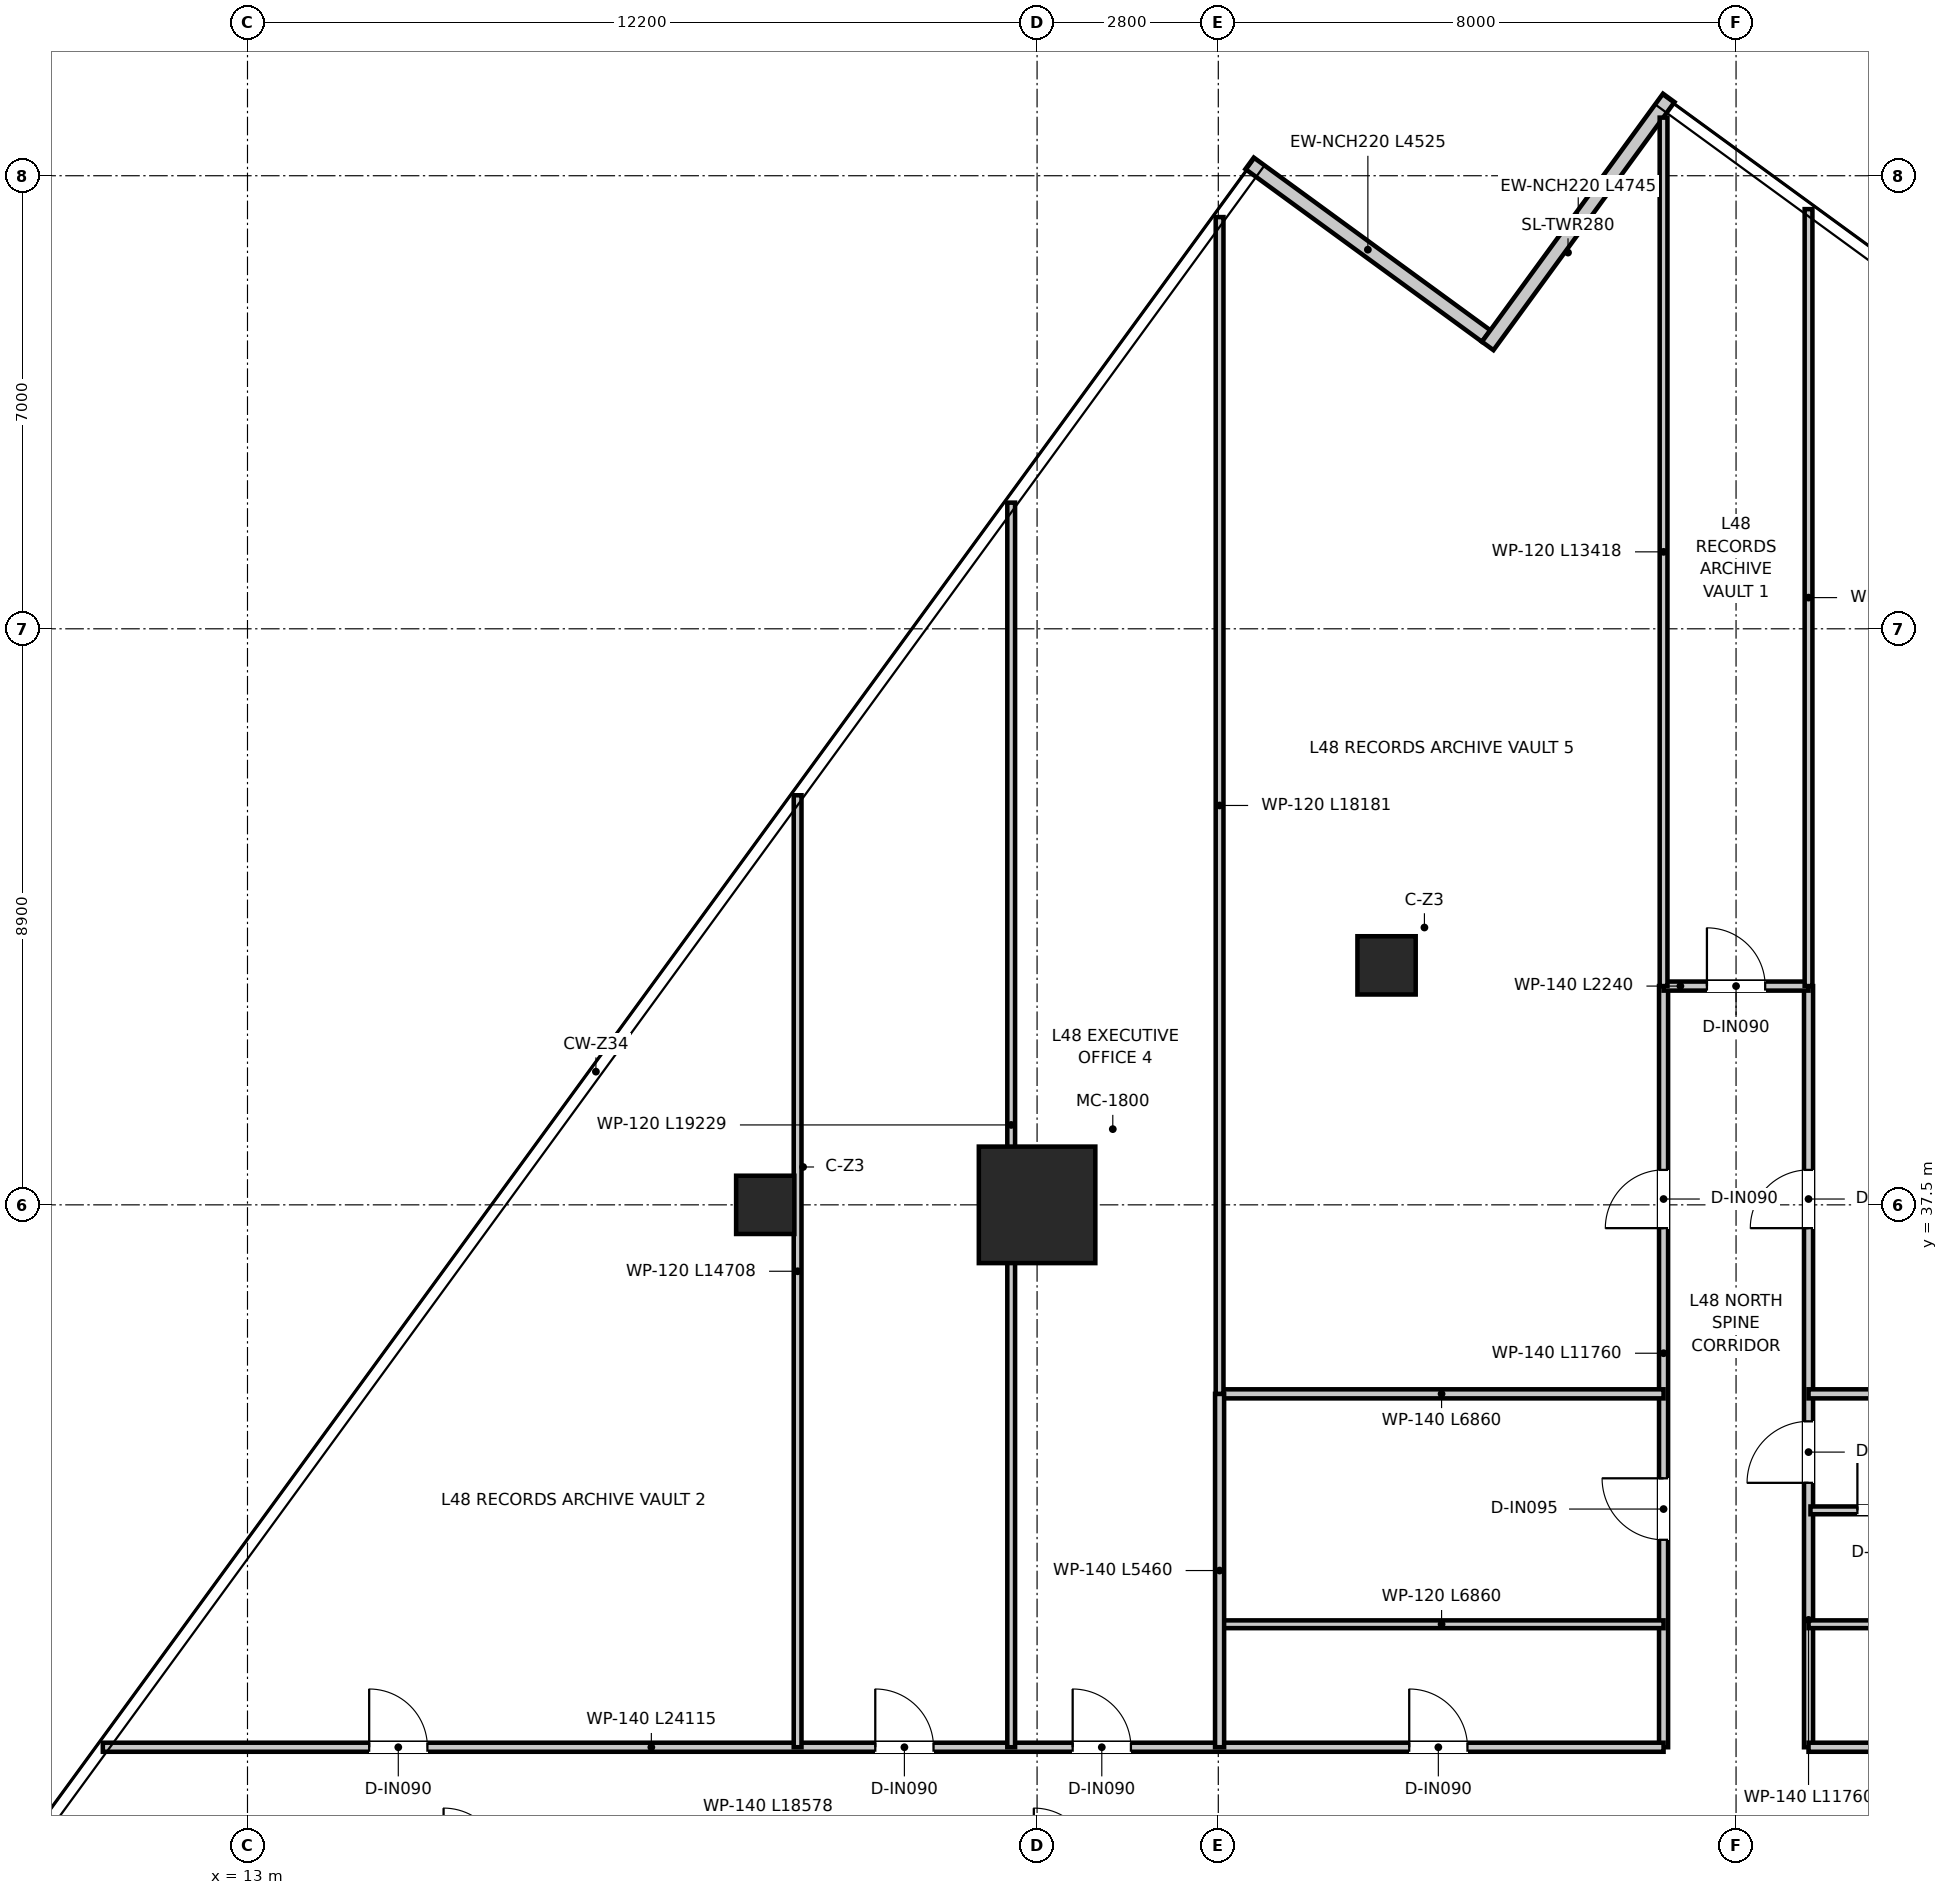
"""IFC4 building model, lengths in metres.
Left out: names, types, materials, properties, quantities, classifications, styles, units other than length and angle.
Written with IfcOpenShell. Run it as: python <this file> out.ifc"""

import sys

from ifc_helpers import new_model, si_unit, direction, frame, frame_2d, origin, origin_2d, place, context, subcontext, project, spatial, rectangle, extrude, source, transform, mapped, element, fill, save


model = new_model("IFC4")
c1 = context("Model", 3, precision=1e-05, world=origin(), true_north=direction((0.0, 1.0)))
c2 = subcontext(c1, "Body", "Model", "MODEL_VIEW")
j1 = project(units=[si_unit("LENGTHUNIT", "METRE"), si_unit("PLANEANGLEUNIT", "RADIAN")], contexts=[c1])
p1 = place(None, origin())
s1 = spatial("IfcSite", under=j1, at=p1, CompositionType="ELEMENT")
p2 = place(p1, origin())
s2 = spatial("IfcBuilding", under=s1, at=p2, CompositionType="ELEMENT")
p3 = place(p2, frame((0.0, 0.0, 197.55)))
s3 = spatial("IfcBuildingStorey", under=s2, at=p3, CompositionType="ELEMENT", Elevation=197.55)
m1 = source(origin(), c2, "Body", "SweptSolid", [
    extrude(rectangle(XDim=1.8, YDim=1.8, at=origin_2d()), origin(), (0.0, 0.0, 1.0), 3.95),
])
p4 = place(p3, frame((25.2, 37.5, 0.0), z_axis=(0.0, 0.0, 1.0), x_axis=(1.0, 0.0, 0.0)))
e1 = element("IfcColumn", 1, at=p4, inside=s3, PredefinedType="USERDEFINED", context=c2, shape_type="MappedRepresentation", body=[
    mapped(m1, transform((0.0, 0.0, 0.0), x_axis=(1.0, 0.0, 0.0), y_axis=(0.0, 1.0, 0.0), z_axis=(0.0, 0.0, 1.0), scale=1.0)),
])
m2 = source(origin(), c2, "Body", "SweptSolid", [
    extrude(rectangle(XDim=0.9, YDim=0.9, at=origin_2d()), origin(), (0.0, 0.0, 1.0), 3.95),
])
for number, where, z_axis, x_axis in (
    (2, (21.0, 37.5, 0.0), (0.0, 0.0, 1.0), (1.0, 0.0, 0.0)),
    (3, (30.6, 41.2, 0.0), (0.0, 0.0, 1.0), (1.0, 0.0, 0.0)),
):
    element("IfcColumn", number, at=place(p3, frame(where, z_axis=z_axis, x_axis=x_axis)), inside=s3, PredefinedType="COLUMN", context=c2, shape_type="MappedRepresentation", body=[
        mapped(m2, transform((0.0, 0.0, 0.0), x_axis=(1.0, 0.0, 0.0), y_axis=(0.0, 1.0, 0.0), z_axis=(0.0, 0.0, 1.0), scale=1.0)),
    ])
p5 = place(p3, frame((32.139, 50.924, 0.0), z_axis=(0.0, 0.0, 1.0), x_axis=(-0.807734007732, 0.589547091209, 0.0)))
e4 = element("IfcWall", 4, at=p5, inside=s3, PredefinedType="ELEMENTEDWALL", context=c2, shape_type="SweptSolid", body=[
    extrude(rectangle(XDim=4.525, YDim=0.22, at=frame_2d((2.263, 0.0))), origin(), (0.0, 0.0, 1.0), 3.59),
])
p6 = place(p3, frame((34.96, 54.603, 0.0), z_axis=(0.0, 0.0, 1.0), x_axis=(-0.589559809791, -0.807724724568, 0.0)))
e5 = element("IfcWall", 5, at=p6, inside=s3, PredefinedType="ELEMENTEDWALL", context=c2, shape_type="SweptSolid", body=[
    extrude(rectangle(XDim=4.745, YDim=0.22, at=frame_2d((2.373, 0.0))), origin(), (0.0, 0.0, 1.0), 3.59),
])
p7 = place(p3, frame((34.88, 29.12, 0.0), z_axis=(0.0, 0.0, 1.0), x_axis=(0.0, 1.0, 0.0)))
e6 = element("IfcWall", 6, at=p7, inside=s3, PredefinedType="PARTITIONING", context=c2, shape_type="SweptSolid", body=[
    extrude(rectangle(XDim=11.76, YDim=0.14, at=frame_2d((5.88, 0.0))), origin(), (0.0, 0.0, 1.0), 2.95),
])
p8 = place(p7, frame((3.205, 0.0, 0.0)))
e7 = element("IfcOpeningElement", 7, at=p8, cuts=e6, PredefinedType="OPENING", context=c2, shape_type="SweptSolid", body=[
    extrude(rectangle(XDim=0.95, YDim=2.1, at=frame_2d((0.475, 1.05))), frame((0.0, 0.08, 0.0), z_axis=(0.0, -1.0, 0.0), x_axis=(1.0, 0.0, 0.0)), (0.0, 0.0, 1.0), 0.16),
])
p9 = place(p7, frame((8.02, 0.0, 0.0)))
e8 = element("IfcOpeningElement", 8, at=p9, cuts=e6, PredefinedType="OPENING", context=c2, shape_type="SweptSolid", body=[
    extrude(rectangle(XDim=0.9, YDim=2.1, at=frame_2d((0.45, 1.05))), frame((0.0, 0.08, 0.0), z_axis=(0.0, -1.0, 0.0), x_axis=(1.0, 0.0, 0.0)), (0.0, 0.0, 1.0), 0.16),
])
p10 = place(p3, frame((37.12, 29.12, 0.0), z_axis=(0.0, 0.0, 1.0), x_axis=(0.0, 1.0, 0.0)))
e9 = element("IfcWall", 9, at=p10, inside=s3, PredefinedType="PARTITIONING", context=c2, shape_type="SweptSolid", body=[
    extrude(rectangle(XDim=11.76, YDim=0.14, at=frame_2d((5.88, 0.0))), origin(), (0.0, 0.0, 1.0), 2.95),
])
p11 = place(p10, frame((4.085, 0.0, 0.0)))
e10 = element("IfcOpeningElement", 10, at=p11, cuts=e9, PredefinedType="OPENING", context=c2, shape_type="SweptSolid", body=[
    extrude(rectangle(XDim=0.95, YDim=2.1, at=frame_2d((0.475, 1.05))), frame((0.0, 0.08, 0.0), z_axis=(0.0, -1.0, 0.0), x_axis=(1.0, 0.0, 0.0)), (0.0, 0.0, 1.0), 0.16),
])
p12 = place(p10, frame((8.02, 0.0, 0.0)))
e11 = element("IfcOpeningElement", 11, at=p12, cuts=e9, PredefinedType="OPENING", context=c2, shape_type="SweptSolid", body=[
    extrude(rectangle(XDim=0.9, YDim=2.1, at=frame_2d((0.45, 1.05))), frame((0.0, 0.08, 0.0), z_axis=(0.0, -1.0, 0.0), x_axis=(1.0, 0.0, 0.0)), (0.0, 0.0, 1.0), 0.16),
])
p13 = place(p3, frame((34.88, 40.88, 0.0), z_axis=(0.0, 0.0, 1.0), x_axis=(1.0, 0.0, 0.0)))
e12 = element("IfcWall", 12, at=p13, inside=s3, PredefinedType="PARTITIONING", context=c2, shape_type="SweptSolid", body=[
    extrude(rectangle(XDim=2.24, YDim=0.14, at=frame_2d((1.12, 0.0))), origin(), (0.0, 0.0, 1.0), 3.59),
])
p14 = place(p13, frame((0.67, 0.0, 0.0)))
e13 = element("IfcOpeningElement", 13, at=p14, cuts=e12, PredefinedType="OPENING", context=c2, shape_type="SweptSolid", body=[
    extrude(rectangle(XDim=0.9, YDim=2.1, at=frame_2d((0.45, 1.05))), frame((0.0, 0.08, 0.0), z_axis=(0.0, -1.0, 0.0), x_axis=(1.0, 0.0, 0.0)), (0.0, 0.0, 1.0), 0.16),
])
p15 = place(p3, frame((10.765, 29.12, 0.0), z_axis=(0.0, 0.0, 1.0), x_axis=(1.0, 0.0, 0.0)))
e14 = element("IfcWall", 14, at=p15, inside=s3, PredefinedType="PARTITIONING", context=c2, shape_type="SweptSolid", body=[
    extrude(rectangle(XDim=24.115, YDim=0.14, at=frame_2d((12.058, 0.0))), origin(), (0.0, 0.0, 1.0), 2.95),
])
p16 = place(p15, frame((20.185, 0.0, 0.0)))
e15 = element("IfcOpeningElement", 15, at=p16, cuts=e14, PredefinedType="OPENING", context=c2, shape_type="SweptSolid", body=[
    extrude(rectangle(XDim=0.9, YDim=2.1, at=frame_2d((0.45, 1.05))), frame((0.0, 0.08, 0.0), z_axis=(0.0, -1.0, 0.0), x_axis=(1.0, 0.0, 0.0)), (0.0, 0.0, 1.0), 0.16),
])
p17 = place(p15, frame((4.115, 0.0, 0.0)))
e16 = element("IfcOpeningElement", 16, at=p17, cuts=e14, PredefinedType="OPENING", context=c2, shape_type="SweptSolid", body=[
    extrude(rectangle(XDim=0.9, YDim=2.1, at=frame_2d((0.45, 1.05))), frame((0.0, 0.08, 0.0), z_axis=(0.0, -1.0, 0.0), x_axis=(1.0, 0.0, 0.0)), (0.0, 0.0, 1.0), 0.16),
])
p18 = place(p15, frame((11.935, 0.0, 0.0)))
e17 = element("IfcOpeningElement", 17, at=p18, cuts=e14, PredefinedType="OPENING", context=c2, shape_type="SweptSolid", body=[
    extrude(rectangle(XDim=0.9, YDim=2.1, at=frame_2d((0.45, 1.05))), frame((0.0, 0.08, 0.0), z_axis=(0.0, -1.0, 0.0), x_axis=(1.0, 0.0, 0.0)), (0.0, 0.0, 1.0), 0.16),
])
p19 = place(p15, frame((14.985, 0.0, 0.0)))
e18 = element("IfcOpeningElement", 18, at=p19, cuts=e14, PredefinedType="OPENING", context=c2, shape_type="SweptSolid", body=[
    extrude(rectangle(XDim=0.9, YDim=2.1, at=frame_2d((0.45, 1.05))), frame((0.0, 0.08, 0.0), z_axis=(0.0, -1.0, 0.0), x_axis=(1.0, 0.0, 0.0)), (0.0, 0.0, 1.0), 0.16),
])
p20 = place(p3, frame((37.12, 29.12, 0.0), z_axis=(0.0, 0.0, 1.0), x_axis=(1.0, 0.0, 0.0)))
e19 = element("IfcWall", 19, at=p20, inside=s3, PredefinedType="PARTITIONING", context=c2, shape_type="SweptSolid", body=[
    extrude(rectangle(XDim=24.697, YDim=0.14, at=frame_2d((12.348, 0.0))), origin(), (0.0, 0.0, 1.0), 2.95),
])
p21 = place(p20, frame((3.03, 0.0, 0.0)))
e20 = element("IfcOpeningElement", 20, at=p21, cuts=e19, PredefinedType="OPENING", context=c2, shape_type="SweptSolid", body=[
    extrude(rectangle(XDim=0.9, YDim=2.1, at=frame_2d((0.45, 1.05))), frame((0.0, 0.08, 0.0), z_axis=(0.0, -1.0, 0.0), x_axis=(1.0, 0.0, 0.0)), (0.0, 0.0, 1.0), 0.16),
])
p22 = place(p20, frame((9.17, 0.0, 0.0)))
e21 = element("IfcOpeningElement", 21, at=p22, cuts=e19, PredefinedType="OPENING", context=c2, shape_type="SweptSolid", body=[
    extrude(rectangle(XDim=0.9, YDim=2.1, at=frame_2d((0.45, 1.05))), frame((0.0, 0.08, 0.0), z_axis=(0.0, -1.0, 0.0), x_axis=(1.0, 0.0, 0.0)), (0.0, 0.0, 1.0), 0.16),
])
p23 = place(p20, frame((18.6, 0.0, 0.0)))
e22 = element("IfcOpeningElement", 22, at=p23, cuts=e19, PredefinedType="OPENING", context=c2, shape_type="SweptSolid", body=[
    extrude(rectangle(XDim=0.9, YDim=2.1, at=frame_2d((0.45, 1.05))), frame((0.0, 0.08, 0.0), z_axis=(0.0, -1.0, 0.0), x_axis=(1.0, 0.0, 0.0)), (0.0, 0.0, 1.0), 0.16),
])
for number, where, z_axis, x_axis in (
    (23, (28.02, 31.02, 0.0), (0.0, 0.0, 1.0), (1.0, 0.0, 0.0)),
    (24, (37.12, 31.02, 0.0), (0.0, 0.0, 1.0), (1.0, 0.0, 0.0)),
):
    element("IfcWall", number, at=place(p3, frame(where, z_axis=z_axis, x_axis=x_axis)), inside=s3, PredefinedType="PARTITIONING", context=c2, shape_type="SweptSolid", body=[
        extrude(rectangle(XDim=6.86, YDim=0.12, at=frame_2d((3.43, 0.0))), origin(), (0.0, 0.0, 1.0), 3.0),
    ])
for number, where, z_axis, x_axis in (
    (25, (28.02, 34.58, 0.0), (0.0, 0.0, 1.0), (1.0, 0.0, 0.0)),
    (26, (37.12, 34.58, 0.0), (0.0, 0.0, 1.0), (1.0, 0.0, 0.0)),
):
    element("IfcWall", number, at=place(p3, frame(where, z_axis=z_axis, x_axis=x_axis)), inside=s3, PredefinedType="PARTITIONING", context=c2, shape_type="SweptSolid", body=[
        extrude(rectangle(XDim=6.86, YDim=0.14, at=frame_2d((3.43, 0.0))), origin(), (0.0, 0.0, 1.0), 3.0),
    ])
p24 = place(p3, frame((28.02, 29.12, 0.0), z_axis=(0.0, 0.0, 1.0), x_axis=(0.0, 1.0, 0.0)))
e27 = element("IfcWall", 27, at=p24, inside=s3, PredefinedType="PARTITIONING", context=c2, shape_type="SweptSolid", body=[
    extrude(rectangle(XDim=5.46, YDim=0.14, at=frame_2d((2.73, 0.0))), origin(), (0.0, 0.0, 1.0), 3.23),
])
p25 = place(p3, frame((37.15, 32.78, 0.0), z_axis=(0.0, 0.0, 1.0), x_axis=(1.0, 0.0, 0.0)))
e28 = element("IfcWall", 28, at=p25, inside=s3, PredefinedType="PARTITIONING", context=c2, shape_type="SweptSolid", body=[
    extrude(rectangle(XDim=6.8, YDim=0.12, at=frame_2d((3.4, 0.0))), origin(), (0.0, 0.0, 1.0), 3.0),
])
p26 = place(p25, frame((0.725, 0.0, 0.0)))
e29 = element("IfcOpeningElement", 29, at=p26, cuts=e28, PredefinedType="OPENING", context=c2, shape_type="SweptSolid", body=[
    extrude(rectangle(XDim=0.85, YDim=2.1, at=frame_2d((0.425, 1.05))), frame((0.0, 0.07, 0.0), z_axis=(0.0, -1.0, 0.0), x_axis=(1.0, 0.0, 0.0)), (0.0, 0.0, 1.0), 0.14),
])
p27 = place(p25, frame((3.065, 0.0, 0.0)))
e30 = element("IfcOpeningElement", 30, at=p27, cuts=e28, PredefinedType="OPENING", context=c2, shape_type="SweptSolid", body=[
    extrude(rectangle(XDim=0.85, YDim=2.1, at=frame_2d((0.425, 1.05))), frame((0.0, 0.07, 0.0), z_axis=(0.0, -1.0, 0.0), x_axis=(1.0, 0.0, 0.0)), (0.0, 0.0, 1.0), 0.14),
])
p28 = place(p25, frame((5.25, 0.0, 0.0)))
e31 = element("IfcOpeningElement", 31, at=p28, cuts=e28, PredefinedType="OPENING", context=c2, shape_type="SweptSolid", body=[
    extrude(rectangle(XDim=0.9, YDim=2.1, at=frame_2d((0.45, 1.05))), frame((0.0, 0.07, 0.0), z_axis=(0.0, -1.0, 0.0), x_axis=(1.0, 0.0, 0.0)), (0.0, 0.0, 1.0), 0.14),
])
p29 = place(p3, frame((34.88, 40.88, 0.0), z_axis=(0.0, 0.0, 1.0), x_axis=(0.0, 1.0, 0.0)))
e32 = element("IfcWall", 32, at=p29, inside=s3, PredefinedType="PARTITIONING", context=c2, shape_type="SweptSolid", body=[
    extrude(rectangle(XDim=13.418, YDim=0.12, at=frame_2d((6.709, 0.0))), origin(), (0.0, 0.0, 1.0), 3.2),
])
p30 = place(p3, frame((37.12, 40.88, 0.0), z_axis=(0.0, 0.0, 1.0), x_axis=(0.0, 1.0, 0.0)))
e33 = element("IfcWall", 33, at=p30, inside=s3, PredefinedType="PARTITIONING", context=c2, shape_type="SweptSolid", body=[
    extrude(rectangle(XDim=12.004, YDim=0.12, at=frame_2d((6.002, 0.0))), origin(), (0.0, 0.0, 1.0), 3.2),
])
p31 = place(p3, frame((21.5, 29.12, 0.0), z_axis=(0.0, 0.0, 1.0), x_axis=(0.0, 1.0, 0.0)))
e34 = element("IfcWall", 34, at=p31, inside=s3, PredefinedType="PARTITIONING", context=c2, shape_type="SweptSolid", body=[
    extrude(rectangle(XDim=14.708, YDim=0.12, at=frame_2d((7.354, 0.0))), origin(), (0.0, 0.0, 1.0), 3.0),
])
p32 = place(p3, frame((24.8, 29.12, 0.0), z_axis=(0.0, 0.0, 1.0), x_axis=(0.0, 1.0, 0.0)))
e35 = element("IfcWall", 35, at=p32, inside=s3, PredefinedType="PARTITIONING", context=c2, shape_type="SweptSolid", body=[
    extrude(rectangle(XDim=19.229, YDim=0.12, at=frame_2d((9.615, 0.0))), origin(), (0.0, 0.0, 1.0), 3.0),
])
p33 = place(p3, frame((28.02, 34.58, 0.0), z_axis=(0.0, 0.0, 1.0), x_axis=(0.0, 1.0, 0.0)))
e36 = element("IfcWall", 36, at=p33, inside=s3, PredefinedType="PARTITIONING", context=c2, shape_type="SweptSolid", body=[
    extrude(rectangle(XDim=18.181, YDim=0.12, at=frame_2d((9.09, 0.0))), origin(), (0.0, 0.0, 1.0), 2.95),
])
p34 = place(p16, origin())
e37 = element("IfcDoor", 37, at=p34, inside=s3, OperationType="SINGLE_SWING_LEFT", PredefinedType="DOOR", context=c2, shape_type="SweptSolid", body=[
    extrude(rectangle(XDim=0.9, YDim=2.1, at=frame_2d((0.45, 1.05))), frame((0.0, 0.025, 0.0), z_axis=(0.0, -1.0, 0.0), x_axis=(1.0, 0.0, 0.0)), (0.0, 0.0, 1.0), 0.05),
])
fill(e15, e37)
p35 = place(p11, origin())
e38 = element("IfcDoor", 38, at=p35, inside=s3, OperationType="SINGLE_SWING_LEFT", PredefinedType="DOOR", context=c2, shape_type="SweptSolid", body=[
    extrude(rectangle(XDim=0.95, YDim=2.1, at=frame_2d((0.475, 1.05))), frame((0.0, 0.025, 0.0), z_axis=(0.0, -1.0, 0.0), x_axis=(1.0, 0.0, 0.0)), (0.0, 0.0, 1.0), 0.05),
])
fill(e10, e38)
p36 = place(p8, origin())
e39 = element("IfcDoor", 39, at=p36, inside=s3, OperationType="SINGLE_SWING_RIGHT", PredefinedType="DOOR", context=c2, shape_type="SweptSolid", body=[
    extrude(rectangle(XDim=0.95, YDim=2.1, at=frame_2d((0.475, 1.05))), frame((0.0, 0.025, 0.0), z_axis=(0.0, -1.0, 0.0), x_axis=(1.0, 0.0, 0.0)), (0.0, 0.0, 1.0), 0.05),
])
fill(e7, e39)
p37 = place(p26, origin())
e40 = element("IfcDoor", 40, at=p37, inside=s3, OperationType="SINGLE_SWING_LEFT", PredefinedType="DOOR", context=c2, shape_type="SweptSolid", body=[
    extrude(rectangle(XDim=0.85, YDim=2.1, at=frame_2d((0.425, 1.05))), frame((0.0, 0.025, 0.0), z_axis=(0.0, -1.0, 0.0), x_axis=(1.0, 0.0, 0.0)), (0.0, 0.0, 1.0), 0.05),
])
fill(e29, e40)
p38 = place(p14, origin())
e41 = element("IfcDoor", 41, at=p38, inside=s3, OperationType="SINGLE_SWING_LEFT", PredefinedType="DOOR", context=c2, shape_type="SweptSolid", body=[
    extrude(rectangle(XDim=0.9, YDim=2.1, at=frame_2d((0.45, 1.05))), frame((0.0, 0.025, 0.0), z_axis=(0.0, -1.0, 0.0), x_axis=(1.0, 0.0, 0.0)), (0.0, 0.0, 1.0), 0.05),
])
fill(e13, e41)
p39 = place(p17, origin())
e42 = element("IfcDoor", 42, at=p39, inside=s3, OperationType="SINGLE_SWING_LEFT", PredefinedType="DOOR", context=c2, shape_type="SweptSolid", body=[
    extrude(rectangle(XDim=0.9, YDim=2.1, at=frame_2d((0.45, 1.05))), frame((0.0, 0.025, 0.0), z_axis=(0.0, -1.0, 0.0), x_axis=(1.0, 0.0, 0.0)), (0.0, 0.0, 1.0), 0.05),
])
fill(e16, e42)
p40 = place(p18, origin())
e43 = element("IfcDoor", 43, at=p40, inside=s3, OperationType="SINGLE_SWING_LEFT", PredefinedType="DOOR", context=c2, shape_type="SweptSolid", body=[
    extrude(rectangle(XDim=0.9, YDim=2.1, at=frame_2d((0.45, 1.05))), frame((0.0, 0.025, 0.0), z_axis=(0.0, -1.0, 0.0), x_axis=(1.0, 0.0, 0.0)), (0.0, 0.0, 1.0), 0.05),
])
fill(e17, e43)
p41 = place(p19, origin())
e44 = element("IfcDoor", 44, at=p41, inside=s3, OperationType="SINGLE_SWING_LEFT", PredefinedType="DOOR", context=c2, shape_type="SweptSolid", body=[
    extrude(rectangle(XDim=0.9, YDim=2.1, at=frame_2d((0.45, 1.05))), frame((0.0, 0.025, 0.0), z_axis=(0.0, -1.0, 0.0), x_axis=(1.0, 0.0, 0.0)), (0.0, 0.0, 1.0), 0.05),
])
fill(e18, e44)
p42 = place(p9, origin())
e45 = element("IfcDoor", 45, at=p42, inside=s3, OperationType="SINGLE_SWING_LEFT", PredefinedType="DOOR", context=c2, shape_type="SweptSolid", body=[
    extrude(rectangle(XDim=0.9, YDim=2.1, at=frame_2d((0.45, 1.05))), frame((0.0, 0.025, 0.0), z_axis=(0.0, -1.0, 0.0), x_axis=(1.0, 0.0, 0.0)), (0.0, 0.0, 1.0), 0.05),
])
fill(e8, e45)
p43 = place(p12, origin())
e46 = element("IfcDoor", 46, at=p43, inside=s3, OperationType="SINGLE_SWING_LEFT", PredefinedType="DOOR", context=c2, shape_type="SweptSolid", body=[
    extrude(rectangle(XDim=0.9, YDim=2.1, at=frame_2d((0.45, 1.05))), frame((0.0, 0.025, 0.0), z_axis=(0.0, -1.0, 0.0), x_axis=(1.0, 0.0, 0.0)), (0.0, 0.0, 1.0), 0.05),
])
fill(e11, e46)
save(model, sys.argv[1])
